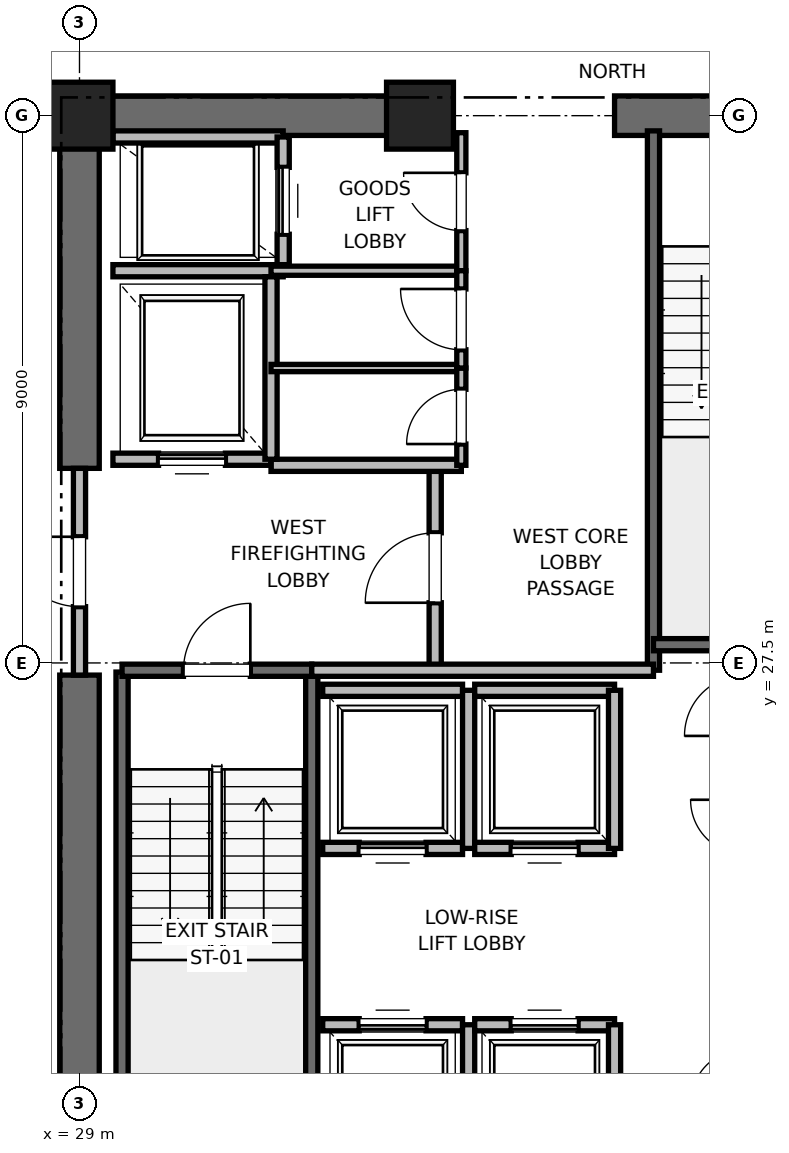
"""IFC4 building model, lengths in metres.
Left out: names, types, materials, properties, quantities, classifications, styles, units other than length and angle.
Written with IfcOpenShell. Run it as: python <this file> out.ifc"""

import sys

from ifc_helpers import new_model, si_unit, direction, frame, frame_2d, origin, origin_2d, place, context, subcontext, project, spatial, rectangle, extrude, element, fill, save


model = new_model("IFC4")
c1 = context("Model", 3, precision=1e-05, world=origin(), true_north=direction((0.0, 1.0)))
c2 = subcontext(c1, "Body", "Model", "MODEL_VIEW")
j1 = project(units=[si_unit("LENGTHUNIT", "METRE"), si_unit("PLANEANGLEUNIT", "RADIAN")], contexts=[c1])
p1 = place(None, origin())
s1 = spatial("IfcSite", under=j1, at=p1, CompositionType="ELEMENT")
p2 = place(p1, origin())
s2 = spatial("IfcBuilding", under=s1, at=p2, CompositionType="ELEMENT")
p3 = place(p2, frame((0.0, 0.0, 51.6)))
s3 = spatial("IfcBuildingStorey", under=s2, at=p3, CompositionType="ELEMENT", Elevation=51.6)
for number, where, z_axis, x_axis in (
    (1, (29.0, 36.5, 0.0), (0.0, 0.0, 1.0), (1.0, 0.0, 0.0)),
    (2, (34.6, 36.5, 0.0), (0.0, 0.0, 1.0), (1.0, 0.0, 0.0)),
):
    element("IfcColumn", number, at=place(p3, frame(where, z_axis=z_axis, x_axis=x_axis)), inside=s3, PredefinedType="PILASTER", context=c2, shape_type="SweptSolid", body=[
        extrude(rectangle(XDim=1.1, YDim=1.1, at=origin_2d()), origin(), (0.0, 0.0, 1.0), 4.0),
    ])
p4 = place(p3, frame((29.0, 36.5, 0.0), z_axis=(0.0, 0.0, 1.0), x_axis=(1.0, 0.0, 0.0)))
e3 = element("IfcWall", 3, at=p4, inside=s3, PredefinedType="SHEAR", context=c2, shape_type="SweptSolid", body=[
    extrude(rectangle(XDim=5.8, YDim=0.65, at=frame_2d((2.9, 0.0))), origin(), (0.0, 0.0, 1.0), 3.76),
])
p5 = place(p3, frame((37.8, 36.5, 0.0), z_axis=(0.0, 0.0, 1.0), x_axis=(1.0, 0.0, 0.0)))
e4 = element("IfcWall", 4, at=p5, inside=s3, PredefinedType="SHEAR", context=c2, shape_type="SweptSolid", body=[
    extrude(rectangle(XDim=4.4, YDim=0.65, at=frame_2d((2.2, 0.0))), origin(), (0.0, 0.0, 1.0), 3.76),
])
p6 = place(p5, frame((1.65, 0.0, 0.0)))
e5 = element("IfcOpeningElement", 5, at=p6, cuts=e4, PredefinedType="OPENING", context=c2, shape_type="SweptSolid", body=[
    extrude(rectangle(XDim=1.1, YDim=2.15, at=frame_2d((0.55, 1.075))), frame((0.0, 0.325, 0.0), z_axis=(0.0, -1.0, 0.0), x_axis=(1.0, 0.0, 0.0)), (0.0, 0.0, 1.0), 0.65),
])
p7 = place(p3, frame((29.0, 18.5, 0.0), z_axis=(0.0, 0.0, 1.0), x_axis=(0.0, 1.0, 0.0)))
e6 = element("IfcWall", 6, at=p7, inside=s3, PredefinedType="SHEAR", context=c2, shape_type="SweptSolid", body=[
    extrude(rectangle(XDim=8.8, YDim=0.65, at=frame_2d((4.4, 0.0))), origin(), (0.0, 0.0, 1.0), 3.76),
])
p8 = place(p3, frame((29.0, 30.7, 0.0), z_axis=(0.0, 0.0, 1.0), x_axis=(0.0, 1.0, 0.0)))
e7 = element("IfcWall", 7, at=p8, inside=s3, PredefinedType="SHEAR", context=c2, shape_type="SweptSolid", body=[
    extrude(rectangle(XDim=5.8, YDim=0.65, at=frame_2d((2.9, 0.0))), origin(), (0.0, 0.0, 1.0), 3.76),
])
p9 = place(p3, frame((29.7, 19.2, 0.0), z_axis=(0.0, 0.0, 1.0), x_axis=(0.0, 1.0, 0.0)))
e8 = element("IfcWall", 8, at=p9, inside=s3, PredefinedType="SOLIDWALL", context=c2, shape_type="SweptSolid", body=[
    extrude(rectangle(XDim=8.15, YDim=0.2, at=frame_2d((4.075, 0.0))), origin(), (0.0, 0.0, 1.0), 3.76),
])
p10 = place(p3, frame((32.82, 18.6, 0.0), z_axis=(0.0, 0.0, 1.0), x_axis=(0.0, 1.0, 0.0)))
e9 = element("IfcWall", 9, at=p10, inside=s3, PredefinedType="SOLIDWALL", context=c2, shape_type="SweptSolid", body=[
    extrude(rectangle(XDim=8.78, YDim=0.2, at=frame_2d((4.39, 0.0))), origin(), (0.0, 0.0, 1.0), 3.76),
])
p11 = place(p3, frame((29.7, 27.38, 0.0), z_axis=(0.0, 0.0, 1.0), x_axis=(1.0, 0.0, 0.0)))
e10 = element("IfcWall", 10, at=p11, inside=s3, PredefinedType="SOLIDWALL", context=c2, shape_type="SweptSolid", body=[
    extrude(rectangle(XDim=3.12, YDim=0.2, at=frame_2d((1.56, 0.0))), origin(), (0.0, 0.0, 1.0), 3.76),
])
p12 = place(p11, frame((1.01, 0.0, 0.0)))
e11 = element("IfcOpeningElement", 11, at=p12, cuts=e10, PredefinedType="OPENING", context=c2, shape_type="SweptSolid", body=[
    extrude(rectangle(XDim=1.1, YDim=2.15, at=frame_2d((0.55, 1.075))), frame((0.0, 0.1, 0.0), z_axis=(0.0, -1.0, 0.0), x_axis=(1.0, 0.0, 0.0)), (0.0, 0.0, 1.0), 0.2),
])
p13 = place(p3, frame((38.44, 27.38, 0.0), z_axis=(0.0, 0.0, 1.0), x_axis=(0.0, 1.0, 0.0)))
e12 = element("IfcWall", 12, at=p13, inside=s3, PredefinedType="SOLIDWALL", context=c2, shape_type="SweptSolid", body=[
    extrude(rectangle(XDim=8.87, YDim=0.2, at=frame_2d((4.435, 0.0))), origin(), (0.0, 0.0, 1.0), 3.76),
])
p14 = place(p3, frame((38.44, 27.8, 0.0), z_axis=(0.0, 0.0, 1.0), x_axis=(1.0, 0.0, 0.0)))
e13 = element("IfcWall", 13, at=p14, inside=s3, PredefinedType="SOLIDWALL", context=c2, shape_type="SweptSolid", body=[
    extrude(rectangle(XDim=3.32, YDim=0.2, at=frame_2d((1.66, 0.0))), origin(), (0.0, 0.0, 1.0), 3.76),
])
p15 = place(p3, frame((34.85, 27.38, 0.0), z_axis=(0.0, 0.0, 1.0), x_axis=(0.0, 1.0, 0.0)))
e14 = element("IfcWall", 14, at=p15, inside=s3, PredefinedType="PARTITIONING", context=c2, shape_type="SweptSolid", body=[
    extrude(rectangle(XDim=3.37, YDim=0.2, at=frame_2d((1.685, 0.0))), origin(), (0.0, 0.0, 1.0), 3.76),
])
p16 = place(p15, frame((1.11, 0.0, 0.0)))
e15 = element("IfcOpeningElement", 15, at=p16, cuts=e14, PredefinedType="OPENING", context=c2, shape_type="SweptSolid", body=[
    extrude(rectangle(XDim=1.15, YDim=2.2, at=frame_2d((0.575, 1.1))), frame((0.0, 0.1, 0.0), z_axis=(0.0, -1.0, 0.0), x_axis=(1.0, 0.0, 0.0)), (0.0, 0.0, 1.0), 0.2),
])
p17 = place(p3, frame((29.0, 27.3, 0.0), z_axis=(0.0, 0.0, 1.0), x_axis=(0.0, 1.0, 0.0)))
e16 = element("IfcWall", 16, at=p17, inside=s3, PredefinedType="PARTITIONING", context=c2, shape_type="SweptSolid", body=[
    extrude(rectangle(XDim=3.4, YDim=0.2, at=frame_2d((1.7, 0.0))), origin(), (0.0, 0.0, 1.0), 2.54),
])
p18 = place(p17, frame((1.125, 0.0, 0.0)))
e17 = element("IfcOpeningElement", 17, at=p18, cuts=e16, PredefinedType="OPENING", context=c2, shape_type="SweptSolid", body=[
    extrude(rectangle(XDim=1.15, YDim=2.2, at=frame_2d((0.575, 1.1))), frame((0.0, 0.1, 0.0), z_axis=(0.0, -1.0, 0.0), x_axis=(1.0, 0.0, 0.0)), (0.0, 0.0, 1.0), 0.2),
])
p19 = place(p3, frame((32.82, 27.38, 0.0), z_axis=(0.0, 0.0, 1.0), x_axis=(1.0, 0.0, 0.0)))
e18 = element("IfcWall", 18, at=p19, inside=s3, PredefinedType="PARTITIONING", context=c2, shape_type="SweptSolid", body=[
    extrude(rectangle(XDim=5.62, YDim=0.2, at=frame_2d((2.81, 0.0))), origin(), (0.0, 0.0, 1.0), 3.76),
])
p20 = place(p3, frame((32.15, 30.75, 0.0), z_axis=(0.0, 0.0, 1.0), x_axis=(1.0, 0.0, 0.0)))
e19 = element("IfcWall", 19, at=p20, inside=s3, PredefinedType="PARTITIONING", context=c2, shape_type="SweptSolid", body=[
    extrude(rectangle(XDim=3.13, YDim=0.2, at=frame_2d((1.565, 0.0))), origin(), (0.0, 0.0, 1.0), 3.76),
])
p21 = place(p3, frame((29.55, 30.85, 0.0), z_axis=(0.0, 0.0, 1.0), x_axis=(1.0, 0.0, 0.0)))
e20 = element("IfcWall", 20, at=p21, inside=s3, PredefinedType="SOLIDWALL", context=c2, shape_type="SweptSolid", body=[
    extrude(rectangle(XDim=2.6, YDim=0.2, at=frame_2d((1.3, 0.0))), origin(), (0.0, 0.0, 1.0), 2.54),
])
p22 = place(p21, frame((0.75, 0.0, 0.0)))
e21 = element("IfcOpeningElement", 21, at=p22, cuts=e20, PredefinedType="OPENING", context=c2, shape_type="SweptSolid", body=[
    extrude(rectangle(XDim=1.1, YDim=2.2, at=frame_2d((0.55, 1.1))), frame((0.0, 0.1, 0.0), z_axis=(0.0, -1.0, 0.0), x_axis=(1.0, 0.0, 0.0)), (0.0, 0.0, 1.0), 0.2),
])
p23 = place(p3, frame((29.55, 33.95, 0.0), z_axis=(0.0, 0.0, 1.0), x_axis=(1.0, 0.0, 0.0)))
e22 = element("IfcWall", 22, at=p23, inside=s3, PredefinedType="SOLIDWALL", context=c2, shape_type="SweptSolid", body=[
    extrude(rectangle(XDim=2.8, YDim=0.2, at=frame_2d((1.4, 0.0))), origin(), (0.0, 0.0, 1.0), 3.76),
])
p24 = place(p3, frame((32.15, 30.85, 0.0), z_axis=(0.0, 0.0, 1.0), x_axis=(0.0, 1.0, 0.0)))
e23 = element("IfcWall", 23, at=p24, inside=s3, PredefinedType="SOLIDWALL", context=c2, shape_type="SweptSolid", body=[
    extrude(rectangle(XDim=3.0, YDim=0.2, at=frame_2d((1.5, 0.0))), origin(), (0.0, 0.0, 1.0), 3.76),
])
p25 = place(p3, frame((32.35, 36.15, 0.0), z_axis=(0.0, 0.0, 1.0), x_axis=(-1.0, 0.0, 0.0)))
e24 = element("IfcWall", 24, at=p25, inside=s3, PredefinedType="SOLIDWALL", context=c2, shape_type="SweptSolid", body=[
    extrude(rectangle(XDim=2.8, YDim=0.2, at=frame_2d((1.4, 0.0))), origin(), (0.0, 0.0, 1.0), 2.889),
])
p26 = place(p3, frame((32.35, 34.05, 0.0), z_axis=(0.0, 0.0, 1.0), x_axis=(0.0, 1.0, 0.0)))
e25 = element("IfcWall", 25, at=p26, inside=s3, PredefinedType="SOLIDWALL", context=c2, shape_type="SweptSolid", body=[
    extrude(rectangle(XDim=2.1, YDim=0.2, at=frame_2d((1.05, 0.0))), origin(), (0.0, 0.0, 1.0), 3.76),
])
p27 = place(p26, frame((0.5, 0.0, 0.0)))
e26 = element("IfcOpeningElement", 26, at=p27, cuts=e25, PredefinedType="OPENING", context=c2, shape_type="SweptSolid", body=[
    extrude(rectangle(XDim=1.1, YDim=2.2, at=frame_2d((0.55, 1.1))), frame((0.0, 0.1, 0.0), z_axis=(0.0, -1.0, 0.0), x_axis=(1.0, 0.0, 0.0)), (0.0, 0.0, 1.0), 0.2),
])
p28 = place(p3, frame((35.3, 21.55, 0.0), z_axis=(0.0, 0.0, 1.0), x_axis=(-1.0, 0.0, 0.0)))
e27 = element("IfcWall", 27, at=p28, inside=s3, PredefinedType="SOLIDWALL", context=c2, shape_type="SweptSolid", body=[
    extrude(rectangle(XDim=2.3, YDim=0.2, at=frame_2d((1.15, 0.0))), origin(), (0.0, 0.0, 1.0), 3.76),
])
p29 = place(p28, frame((0.6, 0.0, 0.0)))
e28 = element("IfcOpeningElement", 28, at=p29, cuts=e27, PredefinedType="OPENING", context=c2, shape_type="SweptSolid", body=[
    extrude(rectangle(XDim=1.1, YDim=2.2, at=frame_2d((0.55, 1.1))), frame((0.0, 0.1, 0.0), z_axis=(0.0, -1.0, 0.0), x_axis=(1.0, 0.0, 0.0)), (0.0, 0.0, 1.0), 0.2),
])
p30 = place(p3, frame((35.4, 18.95, 0.0), z_axis=(0.0, 0.0, 1.0), x_axis=(0.0, 1.0, 0.0)))
e29 = element("IfcWall", 29, at=p30, inside=s3, PredefinedType="SOLIDWALL", context=c2, shape_type="SweptSolid", body=[
    extrude(rectangle(XDim=2.6, YDim=0.2, at=frame_2d((1.3, 0.0))), origin(), (0.0, 0.0, 1.0), 3.76),
])
p31 = place(p3, frame((37.8, 21.55, 0.0), z_axis=(0.0, 0.0, 1.0), x_axis=(-1.0, 0.0, 0.0)))
e30 = element("IfcWall", 30, at=p31, inside=s3, PredefinedType="SOLIDWALL", context=c2, shape_type="SweptSolid", body=[
    extrude(rectangle(XDim=2.3, YDim=0.2, at=frame_2d((1.15, 0.0))), origin(), (0.0, 0.0, 1.0), 3.76),
])
p32 = place(p31, frame((0.6, 0.0, 0.0)))
e31 = element("IfcOpeningElement", 31, at=p32, cuts=e30, PredefinedType="OPENING", context=c2, shape_type="SweptSolid", body=[
    extrude(rectangle(XDim=1.1, YDim=2.2, at=frame_2d((0.55, 1.1))), frame((0.0, 0.1, 0.0), z_axis=(0.0, -1.0, 0.0), x_axis=(1.0, 0.0, 0.0)), (0.0, 0.0, 1.0), 0.2),
])
p33 = place(p3, frame((37.8, 18.95, 0.0), z_axis=(0.0, 0.0, 1.0), x_axis=(0.0, 1.0, 0.0)))
e32 = element("IfcWall", 32, at=p33, inside=s3, PredefinedType="SOLIDWALL", context=c2, shape_type="SweptSolid", body=[
    extrude(rectangle(XDim=2.6, YDim=0.2, at=frame_2d((1.3, 0.0))), origin(), (0.0, 0.0, 1.0), 2.54),
])
p34 = place(p3, frame((33.0, 24.45, 0.0), z_axis=(0.0, 0.0, 1.0), x_axis=(1.0, 0.0, 0.0)))
e33 = element("IfcWall", 33, at=p34, inside=s3, PredefinedType="SOLIDWALL", context=c2, shape_type="SweptSolid", body=[
    extrude(rectangle(XDim=2.3, YDim=0.2, at=frame_2d((1.15, 0.0))), origin(), (0.0, 0.0, 1.0), 3.76),
])
p35 = place(p34, frame((0.6, 0.0, 0.0)))
e34 = element("IfcOpeningElement", 34, at=p35, cuts=e33, PredefinedType="OPENING", context=c2, shape_type="SweptSolid", body=[
    extrude(rectangle(XDim=1.1, YDim=2.2, at=frame_2d((0.55, 1.1))), frame((0.0, 0.1, 0.0), z_axis=(0.0, -1.0, 0.0), x_axis=(1.0, 0.0, 0.0)), (0.0, 0.0, 1.0), 0.2),
])
p36 = place(p3, frame((35.3, 27.05, 0.0), z_axis=(0.0, 0.0, 1.0), x_axis=(-1.0, 0.0, 0.0)))
e35 = element("IfcWall", 35, at=p36, inside=s3, PredefinedType="SOLIDWALL", context=c2, shape_type="SweptSolid", body=[
    extrude(rectangle(XDim=2.3, YDim=0.2, at=frame_2d((1.15, 0.0))), origin(), (0.0, 0.0, 1.0), 3.76),
])
p37 = place(p3, frame((35.4, 24.45, 0.0), z_axis=(0.0, 0.0, 1.0), x_axis=(0.0, 1.0, 0.0)))
e36 = element("IfcWall", 36, at=p37, inside=s3, PredefinedType="SOLIDWALL", context=c2, shape_type="SweptSolid", body=[
    extrude(rectangle(XDim=2.6, YDim=0.2, at=frame_2d((1.3, 0.0))), origin(), (0.0, 0.0, 1.0), 3.76),
])
p38 = place(p3, frame((35.5, 24.45, 0.0), z_axis=(0.0, 0.0, 1.0), x_axis=(1.0, 0.0, 0.0)))
e37 = element("IfcWall", 37, at=p38, inside=s3, PredefinedType="SOLIDWALL", context=c2, shape_type="SweptSolid", body=[
    extrude(rectangle(XDim=2.3, YDim=0.2, at=frame_2d((1.15, 0.0))), origin(), (0.0, 0.0, 1.0), 3.76),
])
p39 = place(p38, frame((0.6, 0.0, 0.0)))
e38 = element("IfcOpeningElement", 38, at=p39, cuts=e37, PredefinedType="OPENING", context=c2, shape_type="SweptSolid", body=[
    extrude(rectangle(XDim=1.1, YDim=2.2, at=frame_2d((0.55, 1.1))), frame((0.0, 0.1, 0.0), z_axis=(0.0, -1.0, 0.0), x_axis=(1.0, 0.0, 0.0)), (0.0, 0.0, 1.0), 0.2),
])
p40 = place(p3, frame((37.8, 27.05, 0.0), z_axis=(0.0, 0.0, 1.0), x_axis=(-1.0, 0.0, 0.0)))
e39 = element("IfcWall", 39, at=p40, inside=s3, PredefinedType="SOLIDWALL", context=c2, shape_type="SweptSolid", body=[
    extrude(rectangle(XDim=2.3, YDim=0.2, at=frame_2d((1.15, 0.0))), origin(), (0.0, 0.0, 1.0), 3.76),
])
p41 = place(p3, frame((37.8, 24.45, 0.0), z_axis=(0.0, 0.0, 1.0), x_axis=(0.0, 1.0, 0.0)))
e40 = element("IfcWall", 40, at=p41, inside=s3, PredefinedType="SOLIDWALL", context=c2, shape_type="SweptSolid", body=[
    extrude(rectangle(XDim=2.6, YDim=0.2, at=frame_2d((1.3, 0.0))), origin(), (0.0, 0.0, 1.0), 3.76),
])
p42 = place(p3, frame((32.15, 33.95, 0.0), z_axis=(0.0, 0.0, 1.0), x_axis=(1.0, 0.0, 0.0)))
e41 = element("IfcWall", 41, at=p42, inside=s3, PredefinedType="PARTITIONING", context=c2, shape_type="SweptSolid", body=[
    extrude(rectangle(XDim=3.13, YDim=0.15, at=frame_2d((1.565, 0.0))), origin(), (0.0, 0.0, 1.0), 2.85),
])
p43 = place(p3, frame((35.28, 33.95, 0.0), z_axis=(0.0, 0.0, 1.0), x_axis=(0.0, 1.0, 0.0)))
e42 = element("IfcWall", 42, at=p43, inside=s3, PredefinedType="PARTITIONING", context=c2, shape_type="SweptSolid", body=[
    extrude(rectangle(XDim=2.27, YDim=0.15, at=frame_2d((1.135, 0.0))), origin(), (0.0, 0.0, 1.0), 2.54),
])
p44 = place(p43, frame((0.66, 0.0, 0.0)))
e43 = element("IfcOpeningElement", 43, at=p44, cuts=e42, PredefinedType="OPENING", context=c2, shape_type="SweptSolid", body=[
    extrude(rectangle(XDim=0.95, YDim=2.15, at=frame_2d((0.475, 1.075))), frame((0.0, 0.075, 0.0), z_axis=(0.0, -1.0, 0.0), x_axis=(1.0, 0.0, 0.0)), (0.0, 0.0, 1.0), 0.15),
])
p45 = place(p3, frame((32.15, 32.35, 0.0), z_axis=(0.0, 0.0, 1.0), x_axis=(1.0, 0.0, 0.0)))
e44 = element("IfcWall", 44, at=p45, inside=s3, PredefinedType="PARTITIONING", context=c2, shape_type="SweptSolid", body=[
    extrude(rectangle(XDim=3.13, YDim=0.12, at=frame_2d((1.565, 0.0))), origin(), (0.0, 0.0, 1.0), 2.85),
])
p46 = place(p3, frame((35.28, 30.75, 0.0), z_axis=(0.0, 0.0, 1.0), x_axis=(0.0, 1.0, 0.0)))
e45 = element("IfcWall", 45, at=p46, inside=s3, PredefinedType="PARTITIONING", context=c2, shape_type="SweptSolid", body=[
    extrude(rectangle(XDim=1.6, YDim=0.15, at=frame_2d((0.8, 0.0))), origin(), (0.0, 0.0, 1.0), 2.85),
])
p47 = place(p46, frame((0.35, 0.0, 0.0)))
e46 = element("IfcOpeningElement", 46, at=p47, cuts=e45, PredefinedType="OPENING", context=c2, shape_type="SweptSolid", body=[
    extrude(rectangle(XDim=0.9, YDim=2.1, at=frame_2d((0.45, 1.05))), frame((0.0, 0.075, 0.0), z_axis=(0.0, -1.0, 0.0), x_axis=(1.0, 0.0, 0.0)), (0.0, 0.0, 1.0), 0.15),
])
p48 = place(p3, frame((35.28, 32.35, 0.0), z_axis=(0.0, 0.0, 1.0), x_axis=(0.0, 1.0, 0.0)))
e47 = element("IfcWall", 47, at=p48, inside=s3, PredefinedType="PARTITIONING", context=c2, shape_type="SweptSolid", body=[
    extrude(rectangle(XDim=1.6, YDim=0.15, at=frame_2d((0.8, 0.0))), origin(), (0.0, 0.0, 1.0), 2.85),
])
p49 = place(p48, frame((0.3, 0.0, 0.0)))
e48 = element("IfcOpeningElement", 48, at=p49, cuts=e47, PredefinedType="OPENING", context=c2, shape_type="SweptSolid", body=[
    extrude(rectangle(XDim=1.0, YDim=2.15, at=frame_2d((0.5, 1.075))), frame((0.0, 0.075, 0.0), z_axis=(0.0, -1.0, 0.0), x_axis=(1.0, 0.0, 0.0)), (0.0, 0.0, 1.0), 0.15),
])
p50 = place(p12, origin())
e49 = element("IfcDoor", 49, at=p50, inside=s3, OperationType="SINGLE_SWING_RIGHT", PredefinedType="DOOR", context=c2, shape_type="SweptSolid", body=[
    extrude(rectangle(XDim=1.1, YDim=2.15, at=frame_2d((0.55, 1.075))), frame((0.0, 0.025, 0.0), z_axis=(0.0, -1.0, 0.0), x_axis=(1.0, 0.0, 0.0)), (0.0, 0.0, 1.0), 0.05),
])
fill(e11, e49)
p51 = place(p16, origin())
e50 = element("IfcDoor", 50, at=p51, inside=s3, OperationType="SINGLE_SWING_LEFT", PredefinedType="DOOR", context=c2, shape_type="SweptSolid", body=[
    extrude(rectangle(XDim=1.15, YDim=2.2, at=frame_2d((0.575, 1.1))), frame((0.0, 0.025, 0.0), z_axis=(0.0, -1.0, 0.0), x_axis=(1.0, 0.0, 0.0)), (0.0, 0.0, 1.0), 0.05),
])
fill(e15, e50)
p52 = place(p18, origin())
e51 = element("IfcDoor", 51, at=p52, inside=s3, OperationType="SINGLE_SWING_RIGHT", PredefinedType="DOOR", context=c2, shape_type="SweptSolid", body=[
    extrude(rectangle(XDim=1.15, YDim=2.2, at=frame_2d((0.575, 1.1))), frame((0.0, 0.025, 0.0), z_axis=(0.0, -1.0, 0.0), x_axis=(1.0, 0.0, 0.0)), (0.0, 0.0, 1.0), 0.05),
])
fill(e17, e51)
p53 = place(p22, origin())
e52 = element("IfcDoor", 52, at=p53, inside=s3, OperationType="SLIDING_TO_RIGHT", PredefinedType="DOOR", context=c2, shape_type="SweptSolid", body=[
    extrude(rectangle(XDim=1.1, YDim=2.2, at=frame_2d((0.55, 1.1))), frame((0.0, 0.025, 0.0), z_axis=(0.0, -1.0, 0.0), x_axis=(1.0, 0.0, 0.0)), (0.0, 0.0, 1.0), 0.05),
])
fill(e21, e52)
p54 = place(p27, origin())
e53 = element("IfcDoor", 53, at=p54, inside=s3, OperationType="SLIDING_TO_RIGHT", PredefinedType="DOOR", context=c2, shape_type="SweptSolid", body=[
    extrude(rectangle(XDim=1.1, YDim=2.2, at=frame_2d((0.55, 1.1))), frame((0.0, 0.025, 0.0), z_axis=(0.0, -1.0, 0.0), x_axis=(1.0, 0.0, 0.0)), (0.0, 0.0, 1.0), 0.05),
])
fill(e26, e53)
p55 = place(p29, origin())
e54 = element("IfcDoor", 54, at=p55, inside=s3, OperationType="SLIDING_TO_RIGHT", PredefinedType="DOOR", context=c2, shape_type="SweptSolid", body=[
    extrude(rectangle(XDim=1.1, YDim=2.2, at=frame_2d((0.55, 1.1))), frame((0.0, 0.025, 0.0), z_axis=(0.0, -1.0, 0.0), x_axis=(1.0, 0.0, 0.0)), (0.0, 0.0, 1.0), 0.05),
])
fill(e28, e54)
p56 = place(p32, origin())
e55 = element("IfcDoor", 55, at=p56, inside=s3, OperationType="SLIDING_TO_RIGHT", PredefinedType="DOOR", context=c2, shape_type="SweptSolid", body=[
    extrude(rectangle(XDim=1.1, YDim=2.2, at=frame_2d((0.55, 1.1))), frame((0.0, 0.025, 0.0), z_axis=(0.0, -1.0, 0.0), x_axis=(1.0, 0.0, 0.0)), (0.0, 0.0, 1.0), 0.05),
])
fill(e31, e55)
p57 = place(p35, origin())
e56 = element("IfcDoor", 56, at=p57, inside=s3, OperationType="SLIDING_TO_RIGHT", PredefinedType="DOOR", context=c2, shape_type="SweptSolid", body=[
    extrude(rectangle(XDim=1.1, YDim=2.2, at=frame_2d((0.55, 1.1))), frame((0.0, 0.025, 0.0), z_axis=(0.0, -1.0, 0.0), x_axis=(1.0, 0.0, 0.0)), (0.0, 0.0, 1.0), 0.05),
])
fill(e34, e56)
p58 = place(p39, origin())
e57 = element("IfcDoor", 57, at=p58, inside=s3, OperationType="SLIDING_TO_RIGHT", PredefinedType="DOOR", context=c2, shape_type="SweptSolid", body=[
    extrude(rectangle(XDim=1.1, YDim=2.2, at=frame_2d((0.55, 1.1))), frame((0.0, 0.025, 0.0), z_axis=(0.0, -1.0, 0.0), x_axis=(1.0, 0.0, 0.0)), (0.0, 0.0, 1.0), 0.05),
])
fill(e38, e57)
p59 = place(p44, origin())
e58 = element("IfcDoor", 58, at=p59, inside=s3, OperationType="SINGLE_SWING_RIGHT", PredefinedType="DOOR", context=c2, shape_type="SweptSolid", body=[
    extrude(rectangle(XDim=0.95, YDim=2.15, at=frame_2d((0.475, 1.075))), frame((0.0, 0.025, 0.0), z_axis=(0.0, -1.0, 0.0), x_axis=(1.0, 0.0, 0.0)), (0.0, 0.0, 1.0), 0.05),
])
fill(e43, e58)
p60 = place(p47, origin())
e59 = element("IfcDoor", 59, at=p60, inside=s3, OperationType="SINGLE_SWING_LEFT", PredefinedType="DOOR", context=c2, shape_type="SweptSolid", body=[
    extrude(rectangle(XDim=0.9, YDim=2.1, at=frame_2d((0.45, 1.05))), frame((0.0, 0.025, 0.0), z_axis=(0.0, -1.0, 0.0), x_axis=(1.0, 0.0, 0.0)), (0.0, 0.0, 1.0), 0.05),
])
fill(e46, e59)
p61 = place(p49, origin())
e60 = element("IfcDoor", 60, at=p61, inside=s3, OperationType="SINGLE_SWING_RIGHT", PredefinedType="DOOR", context=c2, shape_type="SweptSolid", body=[
    extrude(rectangle(XDim=1.0, YDim=2.15, at=frame_2d((0.5, 1.075))), frame((0.0, 0.025, 0.0), z_axis=(0.0, -1.0, 0.0), x_axis=(1.0, 0.0, 0.0)), (0.0, 0.0, 1.0), 0.05),
])
fill(e48, e60)
save(model, sys.argv[1])
